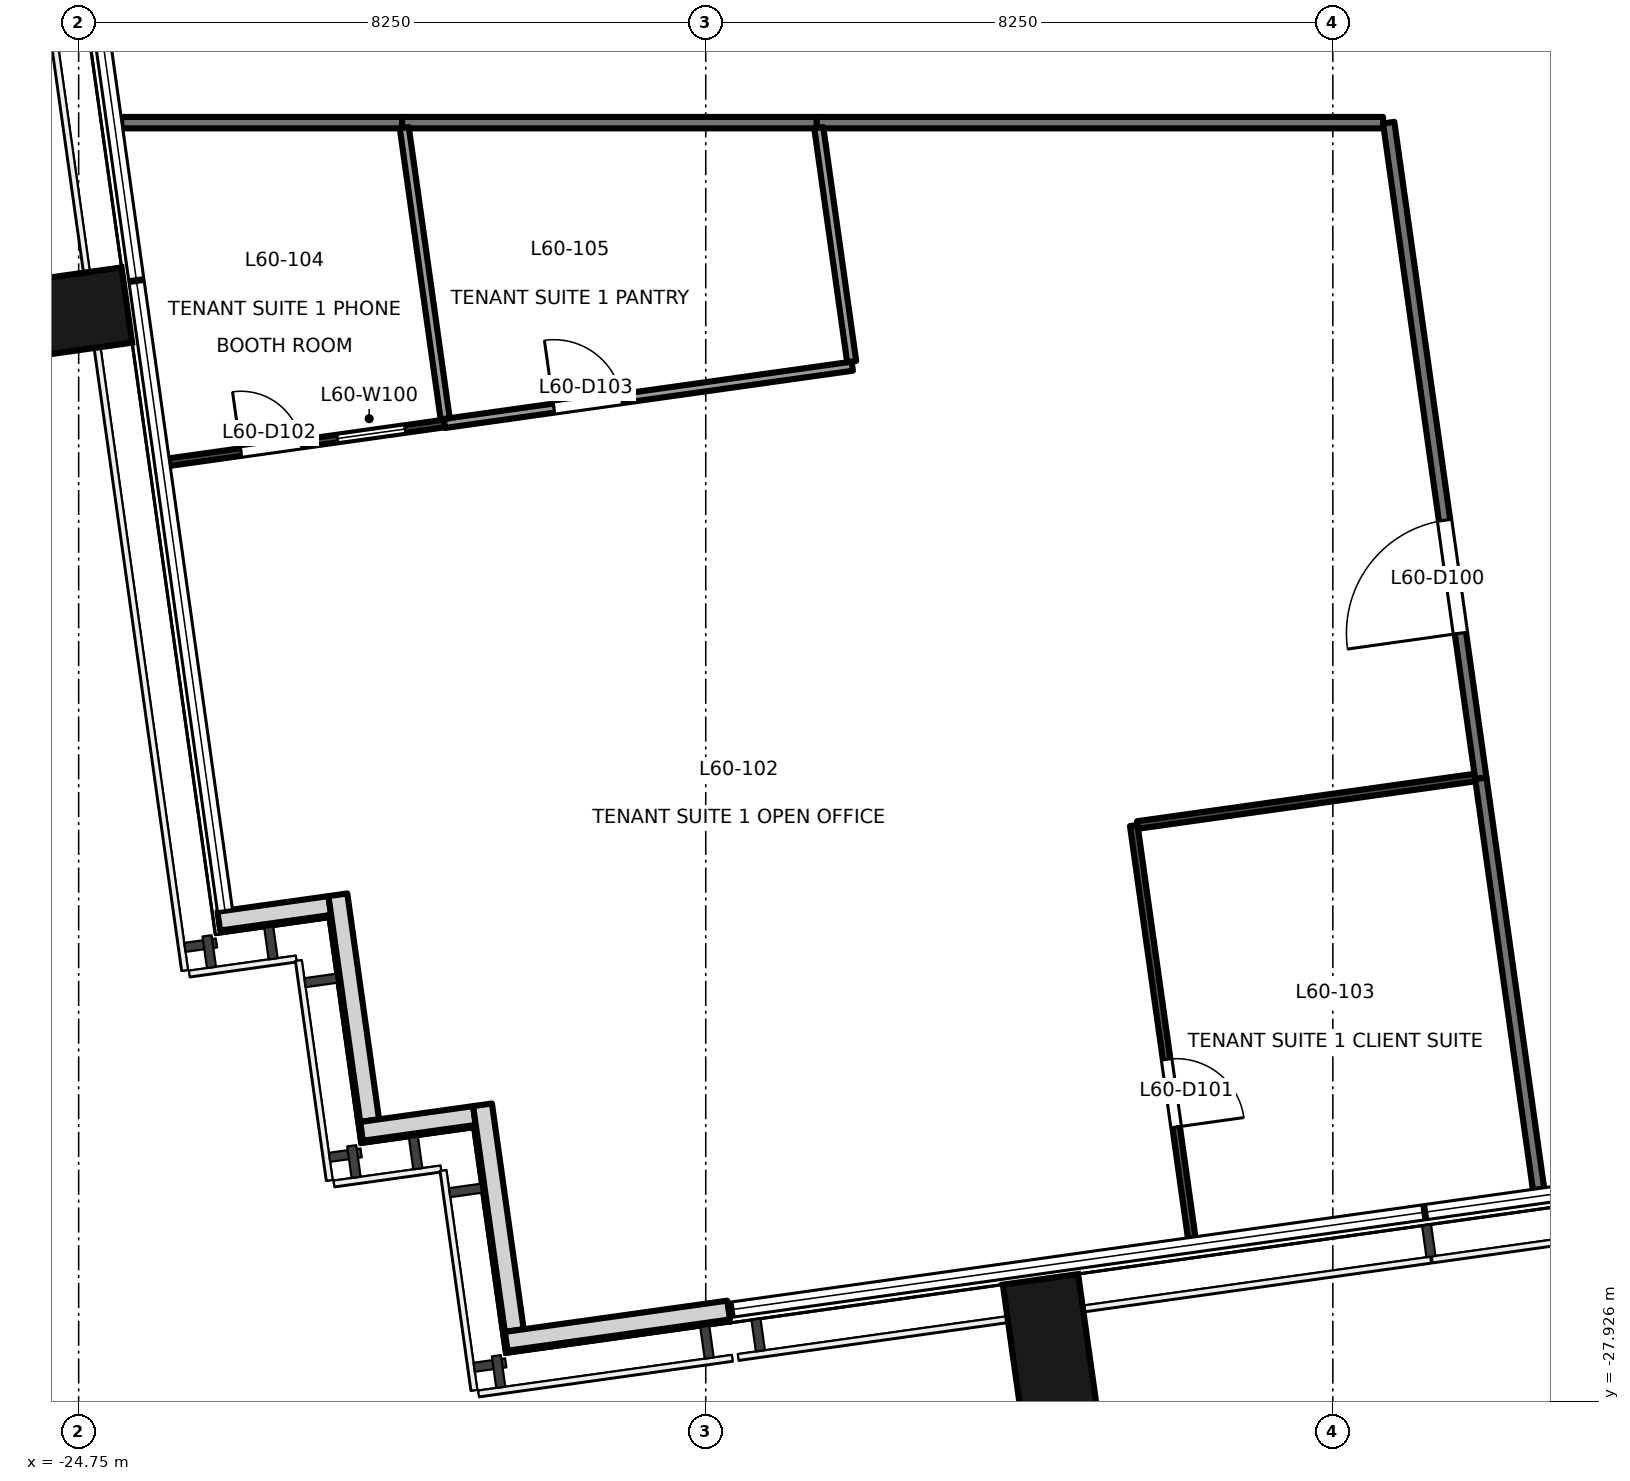
"""IFC4 building model, lengths in metres.
Left out: names, types, materials, properties, quantities, classifications, styles, units other than length and angle.
Written with IfcOpenShell. Run it as: python <this file> out.ifc"""

import sys

from ifc_helpers import new_model, si_unit, direction, frame, frame_2d, origin, origin_2d, place, context, subcontext, project, spatial, rectangle, extrude, element, fill, save


model = new_model("IFC4")
c1 = context("Model", 3, precision=1e-05, world=origin(), true_north=direction((0.0, 1.0)))
c2 = subcontext(c1, "Body", "Model", "MODEL_VIEW")
j1 = project(units=[si_unit("LENGTHUNIT", "METRE"), si_unit("PLANEANGLEUNIT", "RADIAN")], contexts=[c1])
p1 = place(None, origin())
s1 = spatial("IfcSite", under=j1, at=p1, CompositionType="ELEMENT")
p2 = place(p1, origin())
s2 = spatial("IfcBuilding", under=s1, at=p2, CompositionType="ELEMENT")
p3 = place(p2, frame((0.0, 0.0, 262.9)))
s3 = spatial("IfcBuildingStorey", under=s2, at=p3, CompositionType="ELEMENT", Elevation=262.9)
for number, where, z_axis, x_axis in (
    (1, (-11.971, -27.209, -0.2), (0.0, 0.0, 1.0), (0.99, 0.139, 0.0)),
    (2, (-25.007, -13.625, -0.2), (0.0, 0.0, 1.0), (-0.139, 0.99, 0.0)),
):
    element("IfcColumn", number, at=place(p3, frame(where, z_axis=z_axis, x_axis=x_axis)), inside=s3, PredefinedType="COLUMN", context=c2, shape_type="SweptSolid", body=[
        extrude(rectangle(XDim=1.0, YDim=1.8, at=origin_2d()), origin(), (0.0, 0.0, 1.0), 3.9),
    ])
p4 = place(p3, frame((-22.906, -21.605, 0.0), z_axis=(0.0, 0.0, 1.0), x_axis=(0.990235520307, 0.13940449893, 0.0)))
e3 = element("IfcWall", 3, at=p4, inside=s3, PredefinedType="SOLIDWALL", context=c2, shape_type="SweptSolid", body=[
    extrude(rectangle(XDim=1.475, YDim=0.25, at=frame_2d((0.737, 0.0))), origin(), (0.0, 0.0, 1.0), 3.7),
])
p5 = place(p3, frame((-21.34, -21.258, 0.0), z_axis=(0.0, 0.0, 1.0), x_axis=(0.139393225799, -0.990237107263, 0.0)))
e4 = element("IfcWall", 4, at=p5, inside=s3, PredefinedType="SOLIDWALL", context=c2, shape_type="SweptSolid", body=[
    extrude(rectangle(XDim=3.0, YDim=0.25, at=frame_2d((1.5, 0.0))), origin(), (0.0, 0.0, 1.0), 3.7),
])
p6 = place(p3, frame((-21.028, -24.37, 0.0), z_axis=(0.0, 0.0, 1.0), x_axis=(0.990330117064, 0.138730887823, 0.0)))
e5 = element("IfcWall", 5, at=p6, inside=s3, PredefinedType="SOLIDWALL", context=c2, shape_type="SweptSolid", body=[
    extrude(rectangle(XDim=1.499, YDim=0.25, at=frame_2d((0.75, 0.0))), origin(), (0.0, 0.0, 1.0), 3.7),
])
p7 = place(p3, frame((-19.437, -24.021, 0.0), z_axis=(0.0, 0.0, 1.0), x_axis=(0.139358350296, -0.990242015975, 0.0)))
e6 = element("IfcWall", 6, at=p7, inside=s3, PredefinedType="SOLIDWALL", context=c2, shape_type="SweptSolid", body=[
    extrude(rectangle(XDim=2.999, YDim=0.25, at=frame_2d((1.5, 0.0))), origin(), (0.0, 0.0, 1.0), 3.7),
])
p8 = place(p3, frame((-19.125, -27.132, 0.0), z_axis=(0.0, 0.0, 1.0), x_axis=(0.990291981483, 0.139002846771, 0.0)))
e7 = element("IfcWall", 7, at=p8, inside=s3, PredefinedType="SOLIDWALL", context=c2, shape_type="SweptSolid", body=[
    extrude(rectangle(XDim=2.954, YDim=0.25, at=frame_2d((1.477, 0.0))), origin(), (0.0, 0.0, 1.0), 3.7),
])
p9 = place(p3, frame((-7.589, -11.1, 0.0), z_axis=(0.0, 0.0, 1.0), x_axis=(-1.0, 0.0, 0.0)))
e8 = element("IfcWall", 8, at=p9, inside=s3, PredefinedType="PARTITIONING", context=c2, shape_type="SweptSolid", body=[
    extrude(rectangle(XDim=7.453, YDim=0.15, at=frame_2d((3.727, 0.0))), origin(), (0.0, 0.0, 1.0), 2.8),
])
p10 = place(p3, frame((-6.303, -19.726, 0.0), z_axis=(0.0, 0.0, 1.0), x_axis=(-0.139129433731, 0.990274204789, 0.0)))
e9 = element("IfcWall", 9, at=p10, inside=s3, PredefinedType="PARTITIONING", context=c2, shape_type="SweptSolid", body=[
    extrude(rectangle(XDim=8.711, YDim=0.15, at=frame_2d((4.355, 0.0))), origin(), (0.0, 0.0, 1.0), 3.7),
])
p11 = place(p10, frame((1.928, 0.0, 0.0)))
e10 = element("IfcOpeningElement", 10, at=p11, cuts=e9, PredefinedType="OPENING", context=c2, shape_type="SweptSolid", body=[
    extrude(rectangle(XDim=1.5, YDim=2.1, at=frame_2d((0.75, 1.05))), frame((0.0, 0.085, 0.0), z_axis=(0.0, -1.0, 0.0), x_axis=(1.0, 0.0, 0.0)), (0.0, 0.0, 1.0), 0.171),
])
p12 = place(p3, frame((-5.543, -25.133, 0.0), z_axis=(0.0, 0.0, 1.0), x_axis=(-0.139192487281, 0.990265343978, 0.0)))
e11 = element("IfcWall", 11, at=p12, inside=s3, PredefinedType="PARTITIONING", context=c2, shape_type="SweptSolid", body=[
    extrude(rectangle(XDim=5.46, YDim=0.15, at=frame_2d((2.73, 0.0))), origin(), (0.0, 0.0, 1.0), 3.7),
])
p13 = place(p3, frame((-20.495, -11.1, 0.0), z_axis=(0.0, 0.0, 1.0), x_axis=(-1.0, 0.0, 0.0)))
e12 = element("IfcWall", 12, at=p13, inside=s3, PredefinedType="PARTITIONING", context=c2, shape_type="SweptSolid", body=[
    extrude(rectangle(XDim=3.695, YDim=0.15, at=frame_2d((1.847, 0.0))), origin(), (0.0, 0.0, 1.0), 3.7),
])
p14 = place(p3, frame((-15.042, -11.1, 0.0), z_axis=(0.0, 0.0, 1.0), x_axis=(-1.0, 0.0, 0.0)))
e13 = element("IfcWall", 13, at=p14, inside=s3, PredefinedType="PARTITIONING", context=c2, shape_type="SweptSolid", body=[
    extrude(rectangle(XDim=5.453, YDim=0.15, at=frame_2d((2.727, 0.0))), origin(), (0.0, 0.0, 1.0), 3.7),
])
p15 = place(p3, frame((-10.869, -20.347, 0.0), z_axis=(0.0, 0.0, 1.0), x_axis=(0.139213194633, -0.990262433116, 0.0)))
e14 = element("IfcWall", 14, at=p15, inside=s3, PredefinedType="PARTITIONING", context=c2, shape_type="SweptSolid", body=[
    extrude(rectangle(XDim=5.48, YDim=0.1, at=frame_2d((2.74, 0.0))), origin(), (0.0, 0.0, 1.0), 3.7),
])
p16 = place(p15, frame((3.106, 0.0, 0.0)))
e15 = element("IfcOpeningElement", 15, at=p16, cuts=e14, PredefinedType="OPENING", context=c2, shape_type="SweptSolid", body=[
    extrude(rectangle(XDim=0.9, YDim=2.1, at=frame_2d((0.45, 1.05))), frame((0.0, 0.061, 0.0), z_axis=(0.0, -1.0, 0.0), x_axis=(1.0, 0.0, 0.0)), (0.0, 0.0, 1.0), 0.121),
])
p17 = place(p3, frame((-6.38, -19.716, 0.0), z_axis=(0.0, 0.0, 1.0), x_axis=(-0.990263970159, -0.139202260778, 0.0)))
e16 = element("IfcWall", 16, at=p17, inside=s3, PredefinedType="PARTITIONING", context=c2, shape_type="SweptSolid", body=[
    extrude(rectangle(XDim=4.483, YDim=0.1, at=frame_2d((2.241, 0.0))), origin(), (0.0, 0.0, 1.0), 2.8),
])
p18 = place(p3, frame((-23.563, -15.567, 0.0), z_axis=(0.0, 0.0, 1.0), x_axis=(0.990288176908, 0.139029948846, 0.0)))
e17 = element("IfcWall", 17, at=p18, inside=s3, PredefinedType="PARTITIONING", context=c2, shape_type="SweptSolid", body=[
    extrude(rectangle(XDim=3.66, YDim=0.1, at=frame_2d((1.83, 0.0))), origin(), (0.0, 0.0, 1.0), 3.7),
])
p19 = place(p18, frame((0.958, 0.0, 0.0)))
e18 = element("IfcOpeningElement", 18, at=p19, cuts=e17, PredefinedType="OPENING", context=c2, shape_type="SweptSolid", body=[
    extrude(rectangle(XDim=0.8, YDim=2.1, at=frame_2d((0.4, 1.05))), frame((0.0, 0.061, 0.0), z_axis=(0.0, -1.0, 0.0), x_axis=(1.0, 0.0, 0.0)), (0.0, 0.0, 1.0), 0.121),
])
p20 = place(p18, frame((2.239, 0.0, 0.9)))
e19 = element("IfcOpeningElement", 19, at=p20, cuts=e17, PredefinedType="OPENING", context=c2, shape_type="SweptSolid", body=[
    extrude(rectangle(XDim=0.9, YDim=1.2, at=frame_2d((0.45, 0.6))), frame((0.0, 0.061, 0.0), z_axis=(0.0, -1.0, 0.0), x_axis=(1.0, 0.0, 0.0)), (0.0, 0.0, 1.0), 0.121),
])
p21 = place(p3, frame((-19.939, -15.058, 0.0), z_axis=(0.0, 0.0, 1.0), x_axis=(0.99027122958, 0.139150608569, 0.0)))
e20 = element("IfcWall", 20, at=p21, inside=s3, PredefinedType="PARTITIONING", context=c2, shape_type="SweptSolid", body=[
    extrude(rectangle(XDim=5.42, YDim=0.12, at=frame_2d((2.71, 0.0))), origin(), (0.0, 0.0, 1.0), 3.7),
])
p22 = place(p21, frame((1.456, 0.0, 0.0)))
e21 = element("IfcOpeningElement", 21, at=p22, cuts=e20, PredefinedType="OPENING", context=c2, shape_type="SweptSolid", body=[
    extrude(rectangle(XDim=0.9, YDim=2.1, at=frame_2d((0.45, 1.05))), frame((0.0, 0.071, 0.0), z_axis=(0.0, -1.0, 0.0), x_axis=(1.0, 0.0, 0.0)), (0.0, 0.0, 1.0), 0.141),
])
p23 = place(p3, frame((-14.58, -14.244, 0.0), z_axis=(0.0, 0.0, 1.0), x_axis=(-0.139309006135, 0.990248959005, 0.0)))
e22 = element("IfcWall", 22, at=p23, inside=s3, PredefinedType="PARTITIONING", context=c2, shape_type="SweptSolid", body=[
    extrude(rectangle(XDim=3.107, YDim=0.12, at=frame_2d((1.554, 0.0))), origin(), (0.0, 0.0, 1.0), 3.7),
])
p24 = place(p3, frame((-20.466, -11.167, 0.0), z_axis=(0.0, 0.0, 1.0), x_axis=(0.139192901143, -0.990265285806, 0.0)))
e23 = element("IfcWall", 23, at=p24, inside=s3, PredefinedType="PARTITIONING", context=c2, shape_type="SweptSolid", body=[
    extrude(rectangle(XDim=3.866, YDim=0.12, at=frame_2d((1.933, 0.0))), origin(), (0.0, 0.0, 1.0), 3.7),
])
p25 = place(p11, origin())
e24 = element("IfcDoor", 24, at=p25, inside=s3, OperationType="DOUBLE_DOOR_SINGLE_SWING", PredefinedType="DOOR", context=c2, shape_type="SweptSolid", body=[
    extrude(rectangle(XDim=1.5, YDim=2.1, at=frame_2d((0.75, 1.05))), frame((0.0, 0.025, 0.0), z_axis=(0.0, -1.0, 0.0), x_axis=(1.0, 0.0, 0.0)), (0.0, 0.0, 1.0), 0.05),
])
fill(e10, e24)
p26 = place(p16, origin())
e25 = element("IfcDoor", 25, at=p26, inside=s3, OperationType="SINGLE_SWING_RIGHT", PredefinedType="DOOR", context=c2, shape_type="SweptSolid", body=[
    extrude(rectangle(XDim=0.9, YDim=2.1, at=frame_2d((0.45, 1.05))), frame((0.0, 0.025, 0.0), z_axis=(0.0, -1.0, 0.0), x_axis=(1.0, 0.0, 0.0)), (0.0, 0.0, 1.0), 0.05),
])
fill(e15, e25)
p27 = place(p19, origin())
e26 = element("IfcDoor", 26, at=p27, inside=s3, OperationType="SINGLE_SWING_LEFT", PredefinedType="DOOR", context=c2, shape_type="SweptSolid", body=[
    extrude(rectangle(XDim=0.8, YDim=2.1, at=frame_2d((0.4, 1.05))), frame((0.0, 0.025, 0.0), z_axis=(0.0, -1.0, 0.0), x_axis=(1.0, 0.0, 0.0)), (0.0, 0.0, 1.0), 0.05),
])
fill(e18, e26)
p28 = place(p22, origin())
e27 = element("IfcDoor", 27, at=p28, inside=s3, OperationType="SINGLE_SWING_LEFT", PredefinedType="DOOR", context=c2, shape_type="SweptSolid", body=[
    extrude(rectangle(XDim=0.9, YDim=2.1, at=frame_2d((0.45, 1.05))), frame((0.0, 0.025, 0.0), z_axis=(0.0, -1.0, 0.0), x_axis=(1.0, 0.0, 0.0)), (0.0, 0.0, 1.0), 0.05),
])
fill(e21, e27)
p29 = place(p20, origin())
e28 = element("IfcWindow", 28, at=p29, inside=s3, PartitioningType="SINGLE_PANEL", PredefinedType="WINDOW", context=c2, shape_type="SweptSolid", body=[
    extrude(rectangle(XDim=0.9, YDim=1.2, at=frame_2d((0.45, 0.6))), frame((0.0, 0.03, 0.0), z_axis=(0.0, -1.0, 0.0), x_axis=(1.0, 0.0, 0.0)), (0.0, 0.0, 1.0), 0.06),
])
fill(e19, e28)
save(model, sys.argv[1])
